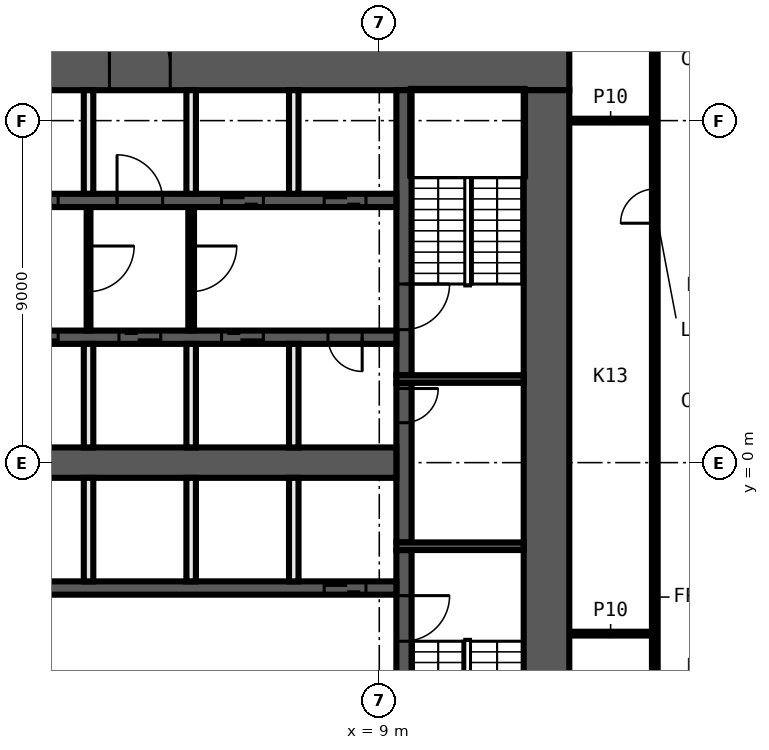
"""IFC4 building model, lengths in metres.
Left out: names, types, materials, properties, quantities, classifications, styles, units other than length and angle.
Written with IfcOpenShell. Run it as: python <this file> out.ifc"""

import sys

from ifc_helpers import new_model, si_unit, direction, frame, frame_2d, origin, place, context, subcontext, project, spatial, rectangle, extrude, element, fill, save


model = new_model("IFC4")
c1 = context("Model", 3, precision=1e-05, world=origin(), true_north=direction((0.0, 1.0)))
c2 = subcontext(c1, "Body", "Model", "MODEL_VIEW")
j1 = project(units=[si_unit("LENGTHUNIT", "METRE"), si_unit("PLANEANGLEUNIT", "RADIAN")], contexts=[c1])
p1 = place(None, origin())
s1 = spatial("IfcSite", under=j1, at=p1, CompositionType="ELEMENT")
p2 = place(p1, origin())
s2 = spatial("IfcBuilding", under=s1, at=p2, CompositionType="ELEMENT")
p3 = place(p2, frame((0.0, 0.0, 58.8)))
s3 = spatial("IfcBuildingStorey", under=s2, at=p3, CompositionType="ELEMENT", Elevation=58.8)
for number, where, z_axis, x_axis in (
    (1, (14.0, -4.5, 0.0), (0.0, 0.0, 1.0), (1.0, 0.0, 0.0)),
    (2, (14.0, 9.0, 0.0), (0.0, 0.0, 1.0), (1.0, 0.0, 0.0)),
):
    element("IfcWall", number, at=place(p3, frame(where, z_axis=z_axis, x_axis=x_axis)), inside=s3, PredefinedType="PARTITIONING", context=c2, shape_type="SweptSolid", body=[
        extrude(rectangle(XDim=2.175, YDim=0.1, at=frame_2d((1.087, 0.0))), origin(), (0.0, 0.0, 1.0), 3.3),
    ])
p4 = place(p3, frame((16.25, -13.175, 0.0), z_axis=(0.0, 0.0, 1.0), x_axis=(0.0, 1.0, 0.0)))
e3 = element("IfcWall", 3, at=p4, inside=s3, PredefinedType="PARTITIONING", context=c2, shape_type="SweptSolid", body=[
    extrude(rectangle(XDim=26.35, YDim=0.15, at=frame_2d((13.175, 0.0))), origin(), (0.0, 0.0, 1.0), 3.3),
])
p5 = place(p4, frame((19.475, 0.0, 0.0)))
e4 = element("IfcOpeningElement", 4, at=p5, cuts=e3, PredefinedType="OPENING", context=c2, shape_type="SweptSolid", body=[
    extrude(rectangle(XDim=0.9, YDim=2.1, at=frame_2d((0.45, 1.05))), frame((0.0, 0.085, 0.0), z_axis=(0.0, -1.0, 0.0), x_axis=(1.0, 0.0, 0.0)), (0.0, 0.0, 1.0), 0.17),
])
p6 = place(p3, frame((-14.0, 10.4, 0.0), z_axis=(0.0, 0.0, 1.0), x_axis=(1.0, 0.0, 0.0)))
e5 = element("IfcWall", 5, at=p6, inside=s3, PredefinedType="SHEAR", context=c2, shape_type="SweptSolid", body=[
    extrude(rectangle(XDim=28.0, YDim=1.2, at=frame_2d((14.0, 0.0))), origin(), (0.0, 0.0, 1.0), 3.3),
])
p7 = place(p6, frame((15.9, 0.0, 0.0)))
e6 = element("IfcOpeningElement", 6, at=p7, cuts=e5, PredefinedType="OPENING", context=c2, shape_type="SweptSolid", body=[
    extrude(rectangle(XDim=1.6, YDim=2.1, at=frame_2d((0.8, 1.05))), frame((0.0, 0.61, 0.0), z_axis=(0.0, -1.0, 0.0), x_axis=(1.0, 0.0, 0.0)), (0.0, 0.0, 1.0), 1.22),
])
p8 = place(p3, frame((13.4, 9.8, 0.0), z_axis=(0.0, 0.0, 1.0), x_axis=(0.0, -1.0, 0.0)))
e7 = element("IfcWall", 7, at=p8, inside=s3, PredefinedType="SHEAR", context=c2, shape_type="SweptSolid", body=[
    extrude(rectangle(XDim=19.6, YDim=1.2, at=frame_2d((9.8, 0.0))), origin(), (0.0, 0.0, 1.0), 3.3),
])
p9 = place(p3, frame((9.65, -2.3, 0.0), z_axis=(0.0, 0.0, 1.0), x_axis=(0.0, -1.0, 0.0)))
e8 = element("IfcWall", 8, at=p9, inside=s3, PredefinedType="SHEAR", context=c2, shape_type="SweptSolid", body=[
    extrude(rectangle(XDim=7.5, YDim=0.4, at=frame_2d((3.75, 0.0))), origin(), (0.0, 0.0, 1.0), 3.3),
])
p10 = place(p9, frame((1.2, 0.0, 0.0)))
e9 = element("IfcOpeningElement", 9, at=p10, cuts=e8, PredefinedType="OPENING", context=c2, shape_type="SweptSolid", body=[
    extrude(rectangle(XDim=1.2, YDim=2.1, at=frame_2d((0.6, 1.05))), frame((0.0, 0.21, 0.0), z_axis=(0.0, -1.0, 0.0), x_axis=(1.0, 0.0, 0.0)), (0.0, 0.0, 1.0), 0.42),
])
p11 = place(p3, frame((9.65, 2.1, 0.0), z_axis=(0.0, 0.0, 1.0), x_axis=(0.0, -1.0, 0.0)))
e10 = element("IfcWall", 10, at=p11, inside=s3, PredefinedType="SHEAR", context=c2, shape_type="SweptSolid", body=[
    extrude(rectangle(XDim=4.2, YDim=0.4, at=frame_2d((2.1, 0.0))), origin(), (0.0, 0.0, 1.0), 3.3),
])
p12 = place(p11, frame((0.15, 0.0, 0.0)))
e11 = element("IfcOpeningElement", 11, at=p12, cuts=e10, PredefinedType="OPENING", context=c2, shape_type="SweptSolid", body=[
    extrude(rectangle(XDim=0.9, YDim=2.1, at=frame_2d((0.45, 1.05))), frame((0.0, 0.21, 0.0), z_axis=(0.0, -1.0, 0.0), x_axis=(1.0, 0.0, 0.0)), (0.0, 0.0, 1.0), 0.42),
])
p13 = place(p3, frame((9.65, 9.8, 0.0), z_axis=(0.0, 0.0, 1.0), x_axis=(0.0, -1.0, 0.0)))
e12 = element("IfcWall", 12, at=p13, inside=s3, PredefinedType="SHEAR", context=c2, shape_type="SweptSolid", body=[
    extrude(rectangle(XDim=7.5, YDim=0.4, at=frame_2d((3.75, 0.0))), origin(), (0.0, 0.0, 1.0), 3.3),
])
p14 = place(p13, frame((5.1, 0.0, 0.0)))
e13 = element("IfcOpeningElement", 13, at=p14, cuts=e12, PredefinedType="OPENING", context=c2, shape_type="SweptSolid", body=[
    extrude(rectangle(XDim=1.2, YDim=2.1, at=frame_2d((0.6, 1.05))), frame((0.0, 0.21, 0.0), z_axis=(0.0, -1.0, 0.0), x_axis=(1.0, 0.0, 0.0)), (0.0, 0.0, 1.0), 0.42),
])
for number, where, z_axis, x_axis in (
    (14, (9.45, 2.2, 0.0), (0.0, 0.0, 1.0), (1.0, 0.0, 0.0)),
    (15, (9.45, -2.2, 0.0), (0.0, 0.0, 1.0), (1.0, 0.0, 0.0)),
):
    element("IfcWall", number, at=place(p3, frame(where, z_axis=z_axis, x_axis=x_axis)), inside=s3, PredefinedType="SHEAR", context=c2, shape_type="SweptSolid", body=[
        extrude(rectangle(XDim=3.35, YDim=0.2, at=frame_2d((1.675, 0.0))), origin(), (0.0, 0.0, 1.0), 3.3),
    ])
p15 = place(p3, frame((-9.45, 6.9, 0.0), z_axis=(0.0, 0.0, 1.0), x_axis=(1.0, 0.0, 0.0)))
e16 = element("IfcWall", 16, at=p15, inside=s3, PredefinedType="SHEAR", context=c2, shape_type="SweptSolid", body=[
    extrude(rectangle(XDim=18.9, YDim=0.35, at=frame_2d((9.45, 0.0))), origin(), (0.0, 0.0, 1.0), 3.3),
])
p16 = place(p15, frame((0.8, 0.0, 0.0)))
e17 = element("IfcOpeningElement", 17, at=p16, cuts=e16, PredefinedType="OPENING", context=c2, shape_type="SweptSolid", body=[
    extrude(rectangle(XDim=1.1, YDim=2.1, at=frame_2d((0.55, 1.05))), frame((0.0, 0.185, 0.0), z_axis=(0.0, -1.0, 0.0), x_axis=(1.0, 0.0, 0.0)), (0.0, 0.0, 1.0), 0.37),
])
p17 = place(p15, frame((3.5, 0.0, 0.0)))
e18 = element("IfcOpeningElement", 18, at=p17, cuts=e16, PredefinedType="OPENING", context=c2, shape_type="SweptSolid", body=[
    extrude(rectangle(XDim=1.1, YDim=2.1, at=frame_2d((0.55, 1.05))), frame((0.0, 0.185, 0.0), z_axis=(0.0, -1.0, 0.0), x_axis=(1.0, 0.0, 0.0)), (0.0, 0.0, 1.0), 0.37),
])
p18 = place(p15, frame((6.2, 0.0, 0.0)))
e19 = element("IfcOpeningElement", 19, at=p18, cuts=e16, PredefinedType="OPENING", context=c2, shape_type="SweptSolid", body=[
    extrude(rectangle(XDim=1.1, YDim=2.1, at=frame_2d((0.55, 1.05))), frame((0.0, 0.185, 0.0), z_axis=(0.0, -1.0, 0.0), x_axis=(1.0, 0.0, 0.0)), (0.0, 0.0, 1.0), 0.37),
])
p19 = place(p15, frame((8.9, 0.0, 0.0)))
e20 = element("IfcOpeningElement", 20, at=p19, cuts=e16, PredefinedType="OPENING", context=c2, shape_type="SweptSolid", body=[
    extrude(rectangle(XDim=1.1, YDim=2.1, at=frame_2d((0.55, 1.05))), frame((0.0, 0.185, 0.0), z_axis=(0.0, -1.0, 0.0), x_axis=(1.0, 0.0, 0.0)), (0.0, 0.0, 1.0), 0.37),
])
p20 = place(p15, frame((11.55, 0.0, 0.0)))
e21 = element("IfcOpeningElement", 21, at=p20, cuts=e16, PredefinedType="OPENING", context=c2, shape_type="SweptSolid", body=[
    extrude(rectangle(XDim=1.2, YDim=2.1, at=frame_2d((0.6, 1.05))), frame((0.0, 0.185, 0.0), z_axis=(0.0, -1.0, 0.0), x_axis=(1.0, 0.0, 0.0)), (0.0, 0.0, 1.0), 0.37),
])
p21 = place(p15, frame((14.3, 0.0, 0.0)))
e22 = element("IfcOpeningElement", 22, at=p21, cuts=e16, PredefinedType="OPENING", context=c2, shape_type="SweptSolid", body=[
    extrude(rectangle(XDim=1.1, YDim=2.1, at=frame_2d((0.55, 1.05))), frame((0.0, 0.185, 0.0), z_axis=(0.0, -1.0, 0.0), x_axis=(1.0, 0.0, 0.0)), (0.0, 0.0, 1.0), 0.37),
])
p22 = place(p15, frame((17.0, 0.0, 0.0)))
e23 = element("IfcOpeningElement", 23, at=p22, cuts=e16, PredefinedType="OPENING", context=c2, shape_type="SweptSolid", body=[
    extrude(rectangle(XDim=1.1, YDim=2.1, at=frame_2d((0.55, 1.05))), frame((0.0, 0.185, 0.0), z_axis=(0.0, -1.0, 0.0), x_axis=(1.0, 0.0, 0.0)), (0.0, 0.0, 1.0), 0.37),
])
p23 = place(p3, frame((9.45, 3.3, 0.0), z_axis=(0.0, 0.0, 1.0), x_axis=(-1.0, 0.0, 0.0)))
e24 = element("IfcWall", 24, at=p23, inside=s3, PredefinedType="SHEAR", context=c2, shape_type="SweptSolid", body=[
    extrude(rectangle(XDim=18.9, YDim=0.35, at=frame_2d((9.45, 0.0))), origin(), (0.0, 0.0, 1.0), 3.3),
])
p24 = place(p23, frame((17.0, 0.0, 0.0)))
e25 = element("IfcOpeningElement", 25, at=p24, cuts=e24, PredefinedType="OPENING", context=c2, shape_type="SweptSolid", body=[
    extrude(rectangle(XDim=1.1, YDim=2.1, at=frame_2d((0.55, 1.05))), frame((0.0, 0.185, 0.0), z_axis=(0.0, -1.0, 0.0), x_axis=(1.0, 0.0, 0.0)), (0.0, 0.0, 1.0), 0.37),
])
p25 = place(p23, frame((14.3, 0.0, 0.0)))
e26 = element("IfcOpeningElement", 26, at=p25, cuts=e24, PredefinedType="OPENING", context=c2, shape_type="SweptSolid", body=[
    extrude(rectangle(XDim=1.1, YDim=2.1, at=frame_2d((0.55, 1.05))), frame((0.0, 0.185, 0.0), z_axis=(0.0, -1.0, 0.0), x_axis=(1.0, 0.0, 0.0)), (0.0, 0.0, 1.0), 0.37),
])
p26 = place(p23, frame((11.6, 0.0, 0.0)))
e27 = element("IfcOpeningElement", 27, at=p26, cuts=e24, PredefinedType="OPENING", context=c2, shape_type="SweptSolid", body=[
    extrude(rectangle(XDim=1.1, YDim=2.1, at=frame_2d((0.55, 1.05))), frame((0.0, 0.185, 0.0), z_axis=(0.0, -1.0, 0.0), x_axis=(1.0, 0.0, 0.0)), (0.0, 0.0, 1.0), 0.37),
])
p27 = place(p23, frame((8.9, 0.0, 0.0)))
e28 = element("IfcOpeningElement", 28, at=p27, cuts=e24, PredefinedType="OPENING", context=c2, shape_type="SweptSolid", body=[
    extrude(rectangle(XDim=1.1, YDim=2.1, at=frame_2d((0.55, 1.05))), frame((0.0, 0.185, 0.0), z_axis=(0.0, -1.0, 0.0), x_axis=(1.0, 0.0, 0.0)), (0.0, 0.0, 1.0), 0.37),
])
p28 = place(p23, frame((6.2, 0.0, 0.0)))
e29 = element("IfcOpeningElement", 29, at=p28, cuts=e24, PredefinedType="OPENING", context=c2, shape_type="SweptSolid", body=[
    extrude(rectangle(XDim=1.1, YDim=2.1, at=frame_2d((0.55, 1.05))), frame((0.0, 0.185, 0.0), z_axis=(0.0, -1.0, 0.0), x_axis=(1.0, 0.0, 0.0)), (0.0, 0.0, 1.0), 0.37),
])
p29 = place(p23, frame((3.5, 0.0, 0.0)))
e30 = element("IfcOpeningElement", 30, at=p29, cuts=e24, PredefinedType="OPENING", context=c2, shape_type="SweptSolid", body=[
    extrude(rectangle(XDim=1.1, YDim=2.1, at=frame_2d((0.55, 1.05))), frame((0.0, 0.185, 0.0), z_axis=(0.0, -1.0, 0.0), x_axis=(1.0, 0.0, 0.0)), (0.0, 0.0, 1.0), 0.37),
])
p30 = place(p23, frame((0.9, 0.0, 0.0)))
e31 = element("IfcOpeningElement", 31, at=p30, cuts=e24, PredefinedType="OPENING", context=c2, shape_type="SweptSolid", body=[
    extrude(rectangle(XDim=0.9, YDim=2.1, at=frame_2d((0.45, 1.05))), frame((0.0, 0.185, 0.0), z_axis=(0.0, -1.0, 0.0), x_axis=(1.0, 0.0, 0.0)), (0.0, 0.0, 1.0), 0.37),
])
p31 = place(p3, frame((-9.45, -3.3, 0.0), z_axis=(0.0, 0.0, 1.0), x_axis=(1.0, 0.0, 0.0)))
e32 = element("IfcWall", 32, at=p31, inside=s3, PredefinedType="SHEAR", context=c2, shape_type="SweptSolid", body=[
    extrude(rectangle(XDim=18.9, YDim=0.35, at=frame_2d((9.45, 0.0))), origin(), (0.0, 0.0, 1.0), 3.3),
])
p32 = place(p31, frame((17.0, 0.0, 0.0)))
e33 = element("IfcOpeningElement", 33, at=p32, cuts=e32, PredefinedType="OPENING", context=c2, shape_type="SweptSolid", body=[
    extrude(rectangle(XDim=1.1, YDim=2.1, at=frame_2d((0.55, 1.05))), frame((0.0, 0.185, 0.0), z_axis=(0.0, -1.0, 0.0), x_axis=(1.0, 0.0, 0.0)), (0.0, 0.0, 1.0), 0.37),
])
p33 = place(p31, frame((0.9, 0.0, 0.0)))
e34 = element("IfcOpeningElement", 34, at=p33, cuts=e32, PredefinedType="OPENING", context=c2, shape_type="SweptSolid", body=[
    extrude(rectangle(XDim=0.9, YDim=2.1, at=frame_2d((0.45, 1.05))), frame((0.0, 0.185, 0.0), z_axis=(0.0, -1.0, 0.0), x_axis=(1.0, 0.0, 0.0)), (0.0, 0.0, 1.0), 0.37),
])
p34 = place(p31, frame((6.3, 0.0, 0.0)))
e35 = element("IfcOpeningElement", 35, at=p34, cuts=e32, PredefinedType="OPENING", context=c2, shape_type="SweptSolid", body=[
    extrude(rectangle(XDim=0.9, YDim=2.1, at=frame_2d((0.45, 1.05))), frame((0.0, 0.185, 0.0), z_axis=(0.0, -1.0, 0.0), x_axis=(1.0, 0.0, 0.0)), (0.0, 0.0, 1.0), 0.37),
])
p35 = place(p3, frame((-9.45, 0.0, 0.0), z_axis=(0.0, 0.0, 1.0), x_axis=(1.0, 0.0, 0.0)))
e36 = element("IfcWall", 36, at=p35, inside=s3, PredefinedType="SHEAR", context=c2, shape_type="SweptSolid", body=[
    extrude(rectangle(XDim=18.9, YDim=0.8, at=frame_2d((9.45, 0.0))), origin(), (0.0, 0.0, 1.0), 3.3),
])
for number, where, z_axis, x_axis in (
    (37, (6.75, -3.125, 0.0), (0.0, 0.0, 1.0), (0.0, 1.0, 0.0)),
    (38, (6.75, 0.4, 0.0), (0.0, 0.0, 1.0), (0.0, 1.0, 0.0)),
    (39, (6.75, 7.075, 0.0), (0.0, 0.0, 1.0), (0.0, 1.0, 0.0)),
):
    element("IfcWall", number, at=place(p3, frame(where, z_axis=z_axis, x_axis=x_axis)), inside=s3, PredefinedType="SOLIDWALL", context=c2, shape_type="SweptSolid", body=[
        extrude(rectangle(XDim=2.725, YDim=0.25, at=frame_2d((1.363, 0.0))), origin(), (0.0, 0.0, 1.0), 3.3),
    ])
p36 = place(p3, frame((4.05, 6.725, 0.0), z_axis=(0.0, 0.0, 1.0), x_axis=(0.0, -1.0, 0.0)))
e40 = element("IfcWall", 40, at=p36, inside=s3, PredefinedType="PARTITIONING", context=c2, shape_type="SweptSolid", body=[
    extrude(rectangle(XDim=3.25, YDim=0.15, at=frame_2d((1.625, 0.0))), origin(), (0.0, 0.0, 1.0), 3.3),
])
p37 = place(p36, frame((1.025, 0.0, 0.0)))
e41 = element("IfcOpeningElement", 41, at=p37, cuts=e40, PredefinedType="OPENING", context=c2, shape_type="SweptSolid", body=[
    extrude(rectangle(XDim=1.2, YDim=2.1, at=frame_2d((0.6, 1.05))), frame((0.0, 0.085, 0.0), z_axis=(0.0, -1.0, 0.0), x_axis=(1.0, 0.0, 0.0)), (0.0, 0.0, 1.0), 0.17),
])
for number, where, z_axis, x_axis in (
    (42, (4.05, -3.125, 0.0), (0.0, 0.0, 1.0), (0.0, 1.0, 0.0)),
    (43, (4.05, 0.4, 0.0), (0.0, 0.0, 1.0), (0.0, 1.0, 0.0)),
    (44, (4.05, 7.075, 0.0), (0.0, 0.0, 1.0), (0.0, 1.0, 0.0)),
):
    element("IfcWall", number, at=place(p3, frame(where, z_axis=z_axis, x_axis=x_axis)), inside=s3, PredefinedType="SOLIDWALL", context=c2, shape_type="SweptSolid", body=[
        extrude(rectangle(XDim=2.725, YDim=0.25, at=frame_2d((1.363, 0.0))), origin(), (0.0, 0.0, 1.0), 3.3),
    ])
p38 = place(p3, frame((1.35, 6.725, 0.0), z_axis=(0.0, 0.0, 1.0), x_axis=(0.0, -1.0, 0.0)))
e45 = element("IfcWall", 45, at=p38, inside=s3, PredefinedType="PARTITIONING", context=c2, shape_type="SweptSolid", body=[
    extrude(rectangle(XDim=3.25, YDim=0.1, at=frame_2d((1.625, 0.0))), origin(), (0.0, 0.0, 1.0), 3.3),
])
p39 = place(p38, frame((1.025, 0.0, 0.0)))
e46 = element("IfcOpeningElement", 46, at=p39, cuts=e45, PredefinedType="OPENING", context=c2, shape_type="SweptSolid", body=[
    extrude(rectangle(XDim=1.2, YDim=2.1, at=frame_2d((0.6, 1.05))), frame((0.0, 0.06, 0.0), z_axis=(0.0, -1.0, 0.0), x_axis=(1.0, 0.0, 0.0)), (0.0, 0.0, 1.0), 0.12),
])
for number, where, z_axis, x_axis in (
    (47, (1.35, -3.125, 0.0), (0.0, 0.0, 1.0), (0.0, 1.0, 0.0)),
    (48, (1.35, 0.4, 0.0), (0.0, 0.0, 1.0), (0.0, 1.0, 0.0)),
    (49, (1.35, 7.075, 0.0), (0.0, 0.0, 1.0), (0.0, 1.0, 0.0)),
):
    element("IfcWall", number, at=place(p3, frame(where, z_axis=z_axis, x_axis=x_axis)), inside=s3, PredefinedType="SOLIDWALL", context=c2, shape_type="SweptSolid", body=[
        extrude(rectangle(XDim=2.725, YDim=0.25, at=frame_2d((1.363, 0.0))), origin(), (0.0, 0.0, 1.0), 3.3),
    ])
p40 = place(p5, origin())
e50 = element("IfcDoor", 50, at=p40, inside=s3, OperationType="SINGLE_SWING_RIGHT", PredefinedType="DOOR", context=c2, shape_type="SweptSolid", body=[
    extrude(rectangle(XDim=0.9, YDim=2.1, at=frame_2d((0.45, 1.05))), frame((0.0, 0.025, 0.0), z_axis=(0.0, -1.0, 0.0), x_axis=(1.0, 0.0, 0.0)), (0.0, 0.0, 1.0), 0.05),
])
fill(e4, e50)
p41 = place(p12, origin())
e51 = element("IfcDoor", 51, at=p41, inside=s3, OperationType="SINGLE_SWING_RIGHT", PredefinedType="DOOR", context=c2, shape_type="SweptSolid", body=[
    extrude(rectangle(XDim=0.9, YDim=2.1, at=frame_2d((0.45, 1.05))), frame((0.0, 0.025, 0.0), z_axis=(0.0, -1.0, 0.0), x_axis=(1.0, 0.0, 0.0)), (0.0, 0.0, 1.0), 0.05),
])
fill(e11, e51)
p42 = place(p19, origin())
e52 = element("IfcDoor", 52, at=p42, inside=s3, OperationType="DOUBLE_DOOR_SLIDING", PredefinedType="DOOR", context=c2, shape_type="SweptSolid", body=[
    extrude(rectangle(XDim=1.1, YDim=2.1, at=frame_2d((0.55, 1.05))), frame((0.0, 0.025, 0.0), z_axis=(0.0, -1.0, 0.0), x_axis=(1.0, 0.0, 0.0)), (0.0, 0.0, 1.0), 0.05),
])
fill(e20, e52)
p43 = place(p7, origin())
e53 = element("IfcDoor", 53, at=p43, inside=s3, OperationType="DOUBLE_DOOR_SINGLE_SWING", PredefinedType="DOOR", context=c2, shape_type="SweptSolid", body=[
    extrude(rectangle(XDim=1.6, YDim=2.1, at=frame_2d((0.8, 1.05))), frame((0.0, 0.025, 0.0), z_axis=(0.0, -1.0, 0.0), x_axis=(1.0, 0.0, 0.0)), (0.0, 0.0, 1.0), 0.05),
])
fill(e6, e53)
p44 = place(p20, origin())
e54 = element("IfcDoor", 54, at=p44, inside=s3, OperationType="SINGLE_SWING_LEFT", PredefinedType="DOOR", context=c2, shape_type="SweptSolid", body=[
    extrude(rectangle(XDim=1.2, YDim=2.1, at=frame_2d((0.6, 1.05))), frame((0.0, 0.025, 0.0), z_axis=(0.0, -1.0, 0.0), x_axis=(1.0, 0.0, 0.0)), (0.0, 0.0, 1.0), 0.05),
])
fill(e21, e54)
p45 = place(p21, origin())
e55 = element("IfcDoor", 55, at=p45, inside=s3, OperationType="DOUBLE_DOOR_SLIDING", PredefinedType="DOOR", context=c2, shape_type="SweptSolid", body=[
    extrude(rectangle(XDim=1.1, YDim=2.1, at=frame_2d((0.55, 1.05))), frame((0.0, 0.025, 0.0), z_axis=(0.0, -1.0, 0.0), x_axis=(1.0, 0.0, 0.0)), (0.0, 0.0, 1.0), 0.05),
])
fill(e22, e55)
p46 = place(p22, origin())
e56 = element("IfcDoor", 56, at=p46, inside=s3, OperationType="DOUBLE_DOOR_SLIDING", PredefinedType="DOOR", context=c2, shape_type="SweptSolid", body=[
    extrude(rectangle(XDim=1.1, YDim=2.1, at=frame_2d((0.55, 1.05))), frame((0.0, 0.025, 0.0), z_axis=(0.0, -1.0, 0.0), x_axis=(1.0, 0.0, 0.0)), (0.0, 0.0, 1.0), 0.05),
])
fill(e23, e56)
p47 = place(p27, origin())
e57 = element("IfcDoor", 57, at=p47, inside=s3, OperationType="DOUBLE_DOOR_SLIDING", PredefinedType="DOOR", context=c2, shape_type="SweptSolid", body=[
    extrude(rectangle(XDim=1.1, YDim=2.1, at=frame_2d((0.55, 1.05))), frame((0.0, 0.025, 0.0), z_axis=(0.0, -1.0, 0.0), x_axis=(1.0, 0.0, 0.0)), (0.0, 0.0, 1.0), 0.05),
])
fill(e28, e57)
p48 = place(p28, origin())
e58 = element("IfcDoor", 58, at=p48, inside=s3, OperationType="DOUBLE_DOOR_SLIDING", PredefinedType="DOOR", context=c2, shape_type="SweptSolid", body=[
    extrude(rectangle(XDim=1.1, YDim=2.1, at=frame_2d((0.55, 1.05))), frame((0.0, 0.025, 0.0), z_axis=(0.0, -1.0, 0.0), x_axis=(1.0, 0.0, 0.0)), (0.0, 0.0, 1.0), 0.05),
])
fill(e29, e58)
p49 = place(p29, origin())
e59 = element("IfcDoor", 59, at=p49, inside=s3, OperationType="DOUBLE_DOOR_SLIDING", PredefinedType="DOOR", context=c2, shape_type="SweptSolid", body=[
    extrude(rectangle(XDim=1.1, YDim=2.1, at=frame_2d((0.55, 1.05))), frame((0.0, 0.025, 0.0), z_axis=(0.0, -1.0, 0.0), x_axis=(1.0, 0.0, 0.0)), (0.0, 0.0, 1.0), 0.05),
])
fill(e30, e59)
p50 = place(p30, origin())
e60 = element("IfcDoor", 60, at=p50, inside=s3, OperationType="SINGLE_SWING_LEFT", PredefinedType="DOOR", context=c2, shape_type="SweptSolid", body=[
    extrude(rectangle(XDim=0.9, YDim=2.1, at=frame_2d((0.45, 1.05))), frame((0.0, 0.025, 0.0), z_axis=(0.0, -1.0, 0.0), x_axis=(1.0, 0.0, 0.0)), (0.0, 0.0, 1.0), 0.05),
])
fill(e31, e60)
p51 = place(p32, origin())
e61 = element("IfcDoor", 61, at=p51, inside=s3, OperationType="DOUBLE_DOOR_SLIDING", PredefinedType="DOOR", context=c2, shape_type="SweptSolid", body=[
    extrude(rectangle(XDim=1.1, YDim=2.1, at=frame_2d((0.55, 1.05))), frame((0.0, 0.025, 0.0), z_axis=(0.0, -1.0, 0.0), x_axis=(1.0, 0.0, 0.0)), (0.0, 0.0, 1.0), 0.05),
])
fill(e33, e61)
p52 = place(p14, origin())
e62 = element("IfcDoor", 62, at=p52, inside=s3, OperationType="SINGLE_SWING_LEFT", PredefinedType="DOOR", context=c2, shape_type="SweptSolid", body=[
    extrude(rectangle(XDim=1.2, YDim=2.1, at=frame_2d((0.6, 1.05))), frame((0.0, 0.025, 0.0), z_axis=(0.0, -1.0, 0.0), x_axis=(1.0, 0.0, 0.0)), (0.0, 0.0, 1.0), 0.05),
])
fill(e13, e62)
p53 = place(p10, origin())
e63 = element("IfcDoor", 63, at=p53, inside=s3, OperationType="SINGLE_SWING_RIGHT", PredefinedType="DOOR", context=c2, shape_type="SweptSolid", body=[
    extrude(rectangle(XDim=1.2, YDim=2.1, at=frame_2d((0.6, 1.05))), frame((0.0, 0.025, 0.0), z_axis=(0.0, -1.0, 0.0), x_axis=(1.0, 0.0, 0.0)), (0.0, 0.0, 1.0), 0.05),
])
fill(e9, e63)
p54 = place(p39, origin())
e64 = element("IfcDoor", 64, at=p54, inside=s3, OperationType="SINGLE_SWING_LEFT", PredefinedType="DOOR", context=c2, shape_type="SweptSolid", body=[
    extrude(rectangle(XDim=1.2, YDim=2.1, at=frame_2d((0.6, 1.05))), frame((0.0, 0.025, 0.0), z_axis=(0.0, -1.0, 0.0), x_axis=(1.0, 0.0, 0.0)), (0.0, 0.0, 1.0), 0.05),
])
fill(e46, e64)
p55 = place(p37, origin())
e65 = element("IfcDoor", 65, at=p55, inside=s3, OperationType="SINGLE_SWING_RIGHT", PredefinedType="DOOR", context=c2, shape_type="SweptSolid", body=[
    extrude(rectangle(XDim=1.2, YDim=2.1, at=frame_2d((0.6, 1.05))), frame((0.0, 0.025, 0.0), z_axis=(0.0, -1.0, 0.0), x_axis=(1.0, 0.0, 0.0)), (0.0, 0.0, 1.0), 0.05),
])
fill(e41, e65)
save(model, sys.argv[1])
